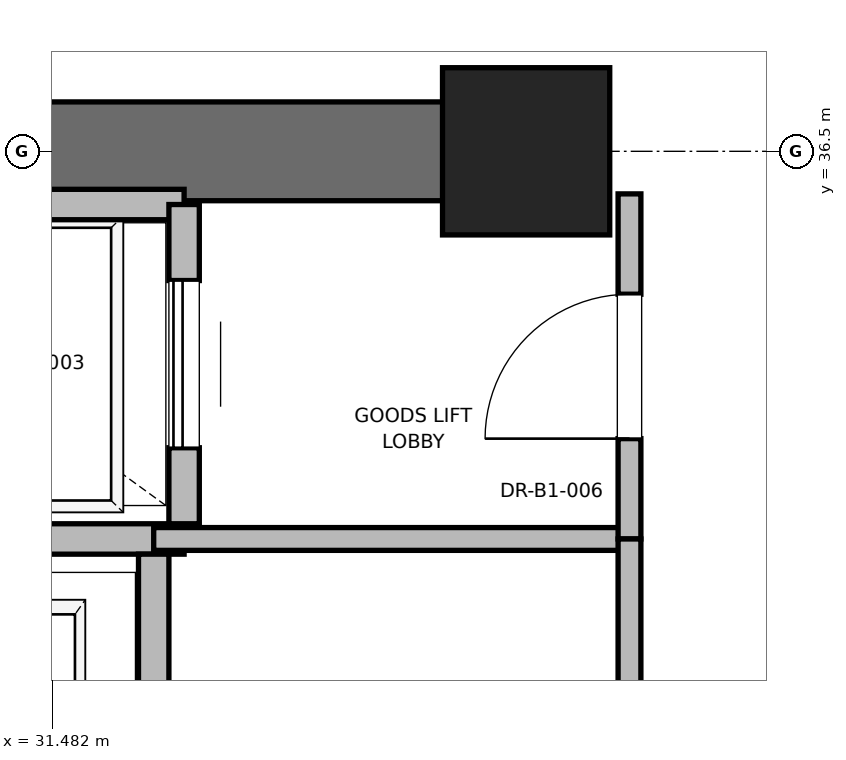
"""IFC4 building model, lengths in metres.
Left out: names, types, materials, properties, quantities, classifications, styles, units other than length and angle.
Written with IfcOpenShell. Run it as: python <this file> out.ifc"""

import sys

from ifc_helpers import new_model, si_unit, direction, frame, frame_2d, origin, origin_2d, place, context, subcontext, project, spatial, rectangle, extrude, element, fill, save


model = new_model("IFC4")
c1 = context("Model", 3, precision=1e-05, world=origin(), true_north=direction((0.0, 1.0)))
c2 = subcontext(c1, "Body", "Model", "MODEL_VIEW")
j1 = project(units=[si_unit("LENGTHUNIT", "METRE"), si_unit("PLANEANGLEUNIT", "RADIAN")], contexts=[c1])
p1 = place(None, origin())
s1 = spatial("IfcSite", under=j1, at=p1, CompositionType="ELEMENT")
p2 = place(p1, origin())
s2 = spatial("IfcBuilding", under=s1, at=p2, CompositionType="ELEMENT")
p3 = place(p2, frame((0.0, 0.0, -4.5)))
s3 = spatial("IfcBuildingStorey", under=s2, at=p3, CompositionType="ELEMENT", Elevation=-4.5)
p4 = place(p3, frame((34.6, 36.5, 0.0), z_axis=(0.0, 0.0, 1.0), x_axis=(1.0, 0.0, 0.0)))
e1 = element("IfcColumn", 1, at=p4, inside=s3, PredefinedType="PILASTER", context=c2, shape_type="SweptSolid", body=[
    extrude(rectangle(XDim=1.1, YDim=1.1, at=origin_2d()), origin(), (0.0, 0.0, 1.0), 4.5),
])
p5 = place(p3, frame((29.0, 36.5, 0.0), z_axis=(0.0, 0.0, 1.0), x_axis=(1.0, 0.0, 0.0)))
e2 = element("IfcWall", 2, at=p5, inside=s3, PredefinedType="SHEAR", context=c2, shape_type="SweptSolid", body=[
    extrude(rectangle(XDim=5.8, YDim=0.65, at=frame_2d((2.9, 0.0))), origin(), (0.0, 0.0, 1.0), 4.22),
])
p6 = place(p3, frame((29.55, 33.95, 0.0), z_axis=(0.0, 0.0, 1.0), x_axis=(1.0, 0.0, 0.0)))
e3 = element("IfcWall", 3, at=p6, inside=s3, PredefinedType="SOLIDWALL", context=c2, shape_type="SweptSolid", body=[
    extrude(rectangle(XDim=2.8, YDim=0.2, at=frame_2d((1.4, 0.0))), origin(), (0.0, 0.0, 1.0), 4.22),
])
p7 = place(p3, frame((32.15, 30.85, 0.0), z_axis=(0.0, 0.0, 1.0), x_axis=(0.0, 1.0, 0.0)))
e4 = element("IfcWall", 4, at=p7, inside=s3, PredefinedType="SOLIDWALL", context=c2, shape_type="SweptSolid", body=[
    extrude(rectangle(XDim=3.0, YDim=0.2, at=frame_2d((1.5, 0.0))), origin(), (0.0, 0.0, 1.0), 4.22),
])
p8 = place(p3, frame((32.35, 36.15, 0.0), z_axis=(0.0, 0.0, 1.0), x_axis=(-1.0, 0.0, 0.0)))
e5 = element("IfcWall", 5, at=p8, inside=s3, PredefinedType="SOLIDWALL", context=c2, shape_type="SweptSolid", body=[
    extrude(rectangle(XDim=2.8, YDim=0.2, at=frame_2d((1.4, 0.0))), origin(), (0.0, 0.0, 1.0), 3.4),
])
p9 = place(p3, frame((32.35, 34.05, 0.0), z_axis=(0.0, 0.0, 1.0), x_axis=(0.0, 1.0, 0.0)))
e6 = element("IfcWall", 6, at=p9, inside=s3, PredefinedType="SOLIDWALL", context=c2, shape_type="SweptSolid", body=[
    extrude(rectangle(XDim=2.1, YDim=0.2, at=frame_2d((1.05, 0.0))), origin(), (0.0, 0.0, 1.0), 4.22),
])
p10 = place(p9, frame((0.5, 0.0, 0.0)))
e7 = element("IfcOpeningElement", 7, at=p10, cuts=e6, PredefinedType="OPENING", context=c2, shape_type="SweptSolid", body=[
    extrude(rectangle(XDim=1.1, YDim=2.2, at=frame_2d((0.55, 1.1))), frame((0.0, 0.1, 0.0), z_axis=(0.0, -1.0, 0.0), x_axis=(1.0, 0.0, 0.0)), (0.0, 0.0, 1.0), 0.2),
])
p11 = place(p3, frame((32.15, 33.95, 0.0), z_axis=(0.0, 0.0, 1.0), x_axis=(1.0, 0.0, 0.0)))
e8 = element("IfcWall", 8, at=p11, inside=s3, PredefinedType="PARTITIONING", context=c2, shape_type="SweptSolid", body=[
    extrude(rectangle(XDim=3.13, YDim=0.15, at=frame_2d((1.565, 0.0))), origin(), (0.0, 0.0, 1.0), 2.85),
])
p12 = place(p3, frame((35.28, 33.95, 0.0), z_axis=(0.0, 0.0, 1.0), x_axis=(0.0, 1.0, 0.0)))
e9 = element("IfcWall", 9, at=p12, inside=s3, PredefinedType="PARTITIONING", context=c2, shape_type="SweptSolid", body=[
    extrude(rectangle(XDim=2.27, YDim=0.15, at=frame_2d((1.135, 0.0))), origin(), (0.0, 0.0, 1.0), 2.85),
])
p13 = place(p12, frame((0.66, 0.0, 0.0)))
e10 = element("IfcOpeningElement", 10, at=p13, cuts=e9, PredefinedType="OPENING", context=c2, shape_type="SweptSolid", body=[
    extrude(rectangle(XDim=0.95, YDim=2.15, at=frame_2d((0.475, 1.075))), frame((0.0, 0.075, 0.0), z_axis=(0.0, -1.0, 0.0), x_axis=(1.0, 0.0, 0.0)), (0.0, 0.0, 1.0), 0.15),
])
p14 = place(p3, frame((35.28, 30.75, 0.0), z_axis=(0.0, 0.0, 1.0), x_axis=(0.0, 1.0, 0.0)))
e11 = element("IfcWall", 11, at=p14, inside=s3, PredefinedType="PARTITIONING", context=c2, shape_type="SweptSolid", body=[
    extrude(rectangle(XDim=3.2, YDim=0.15, at=frame_2d((1.6, 0.0))), origin(), (0.0, 0.0, 1.0), 2.85),
])
p15 = place(p14, frame((1.15, 0.0, 0.0)))
e12 = element("IfcOpeningElement", 12, at=p15, cuts=e11, PredefinedType="OPENING", context=c2, shape_type="SweptSolid", body=[
    extrude(rectangle(XDim=0.9, YDim=2.1, at=frame_2d((0.45, 1.05))), frame((0.0, 0.075, 0.0), z_axis=(0.0, -1.0, 0.0), x_axis=(1.0, 0.0, 0.0)), (0.0, 0.0, 1.0), 0.15),
])
p16 = place(p10, origin())
e13 = element("IfcDoor", 13, at=p16, inside=s3, OperationType="SLIDING_TO_RIGHT", PredefinedType="DOOR", context=c2, shape_type="SweptSolid", body=[
    extrude(rectangle(XDim=1.1, YDim=2.2, at=frame_2d((0.55, 1.1))), frame((0.0, 0.025, 0.0), z_axis=(0.0, -1.0, 0.0), x_axis=(1.0, 0.0, 0.0)), (0.0, 0.0, 1.0), 0.05),
])
fill(e7, e13)
p17 = place(p13, origin())
e14 = element("IfcDoor", 14, at=p17, inside=s3, OperationType="SINGLE_SWING_LEFT", PredefinedType="DOOR", context=c2, shape_type="SweptSolid", body=[
    extrude(rectangle(XDim=0.95, YDim=2.15, at=frame_2d((0.475, 1.075))), frame((0.0, 0.025, 0.0), z_axis=(0.0, -1.0, 0.0), x_axis=(1.0, 0.0, 0.0)), (0.0, 0.0, 1.0), 0.05),
])
fill(e10, e14)
save(model, sys.argv[1])
